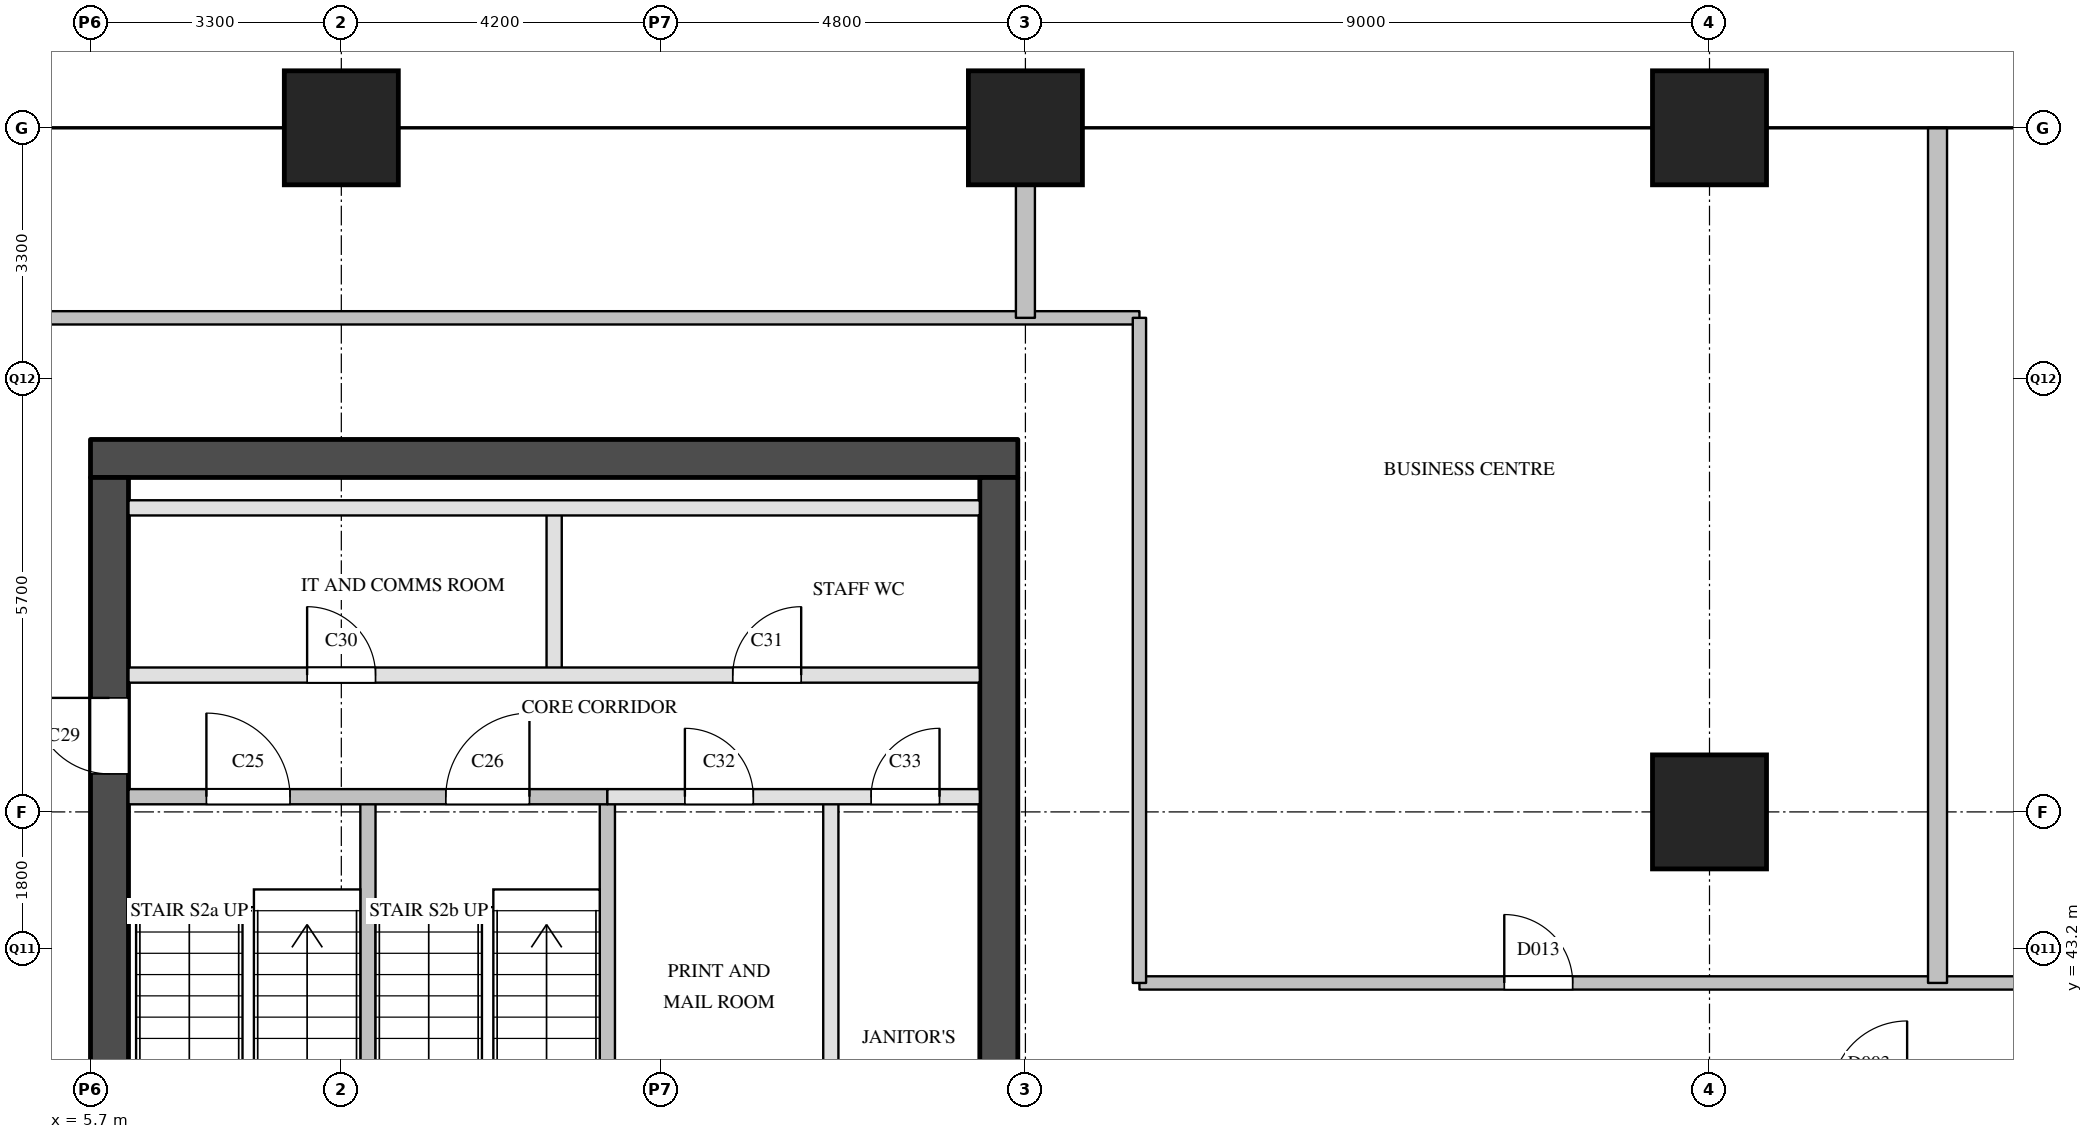
"""IFC4 building model, lengths in metres.
Left out: names, types, materials, properties, quantities, classifications, styles, units other than length and angle.
Written with IfcOpenShell. Run it as: python <this file> out.ifc"""

import sys

from ifc_helpers import new_model, si_unit, direction, frame, frame_2d, origin, origin_2d, place, context, subcontext, project, spatial, rectangle, extrude, element, fill, save


model = new_model("IFC4")
c1 = context("Model", 3, precision=1e-05, world=origin(), true_north=direction((0.0, 1.0)))
c2 = subcontext(c1, "Body", "Model", "MODEL_VIEW")
j1 = project(units=[si_unit("LENGTHUNIT", "METRE"), si_unit("PLANEANGLEUNIT", "RADIAN")], contexts=[c1])
p1 = place(None, origin())
s1 = spatial("IfcSite", under=j1, at=p1, CompositionType="ELEMENT")
p2 = place(p1, origin())
s2 = spatial("IfcBuilding", under=s1, at=p2, CompositionType="ELEMENT")
p3 = place(p2, frame((0.0, 0.0, 154.4)))
s3 = spatial("IfcBuildingStorey", under=s2, at=p3, CompositionType="ELEMENT", Elevation=154.4)
for number, where, z_axis, x_axis in (
    (1, (9.0, 54.0, 0.0), (0.0, 0.0, 1.0), (1.0, 0.0, 0.0)),
    (2, (18.0, 54.0, 0.0), (0.0, 0.0, 1.0), (1.0, 0.0, 0.0)),
    (3, (27.0, 45.0, 0.0), (0.0, 0.0, 1.0), (1.0, 0.0, 0.0)),
    (4, (27.0, 54.0, 0.0), (0.0, 0.0, 1.0), (1.0, 0.0, 0.0)),
):
    element("IfcColumn", number, at=place(p3, frame(where, z_axis=z_axis, x_axis=x_axis)), inside=s3, PredefinedType="COLUMN", context=c2, shape_type="SweptSolid", body=[
        extrude(rectangle(XDim=1.5, YDim=1.5, at=origin_2d()), origin(), (0.0, 0.0, 1.0), 3.9),
    ])
p4 = place(p3, frame((5.7, 49.65, 0.0), z_axis=(0.0, 0.0, 1.0), x_axis=(1.0, 0.0, 0.0)))
e5 = element("IfcWall", 5, at=p4, inside=s3, PredefinedType="SHEAR", context=c2, shape_type="SweptSolid", body=[
    extrude(rectangle(XDim=12.2, YDim=0.5, at=frame_2d((6.1, 0.0))), origin(), (0.0, 0.0, 1.0), 3.6),
])
p5 = place(p3, frame((5.95, 29.1, 0.0), z_axis=(0.0, 0.0, 1.0), x_axis=(0.0, 1.0, 0.0)))
e6 = element("IfcWall", 6, at=p5, inside=s3, PredefinedType="SHEAR", context=c2, shape_type="SweptSolid", body=[
    extrude(rectangle(XDim=20.3, YDim=0.5, at=frame_2d((10.15, 0.0))), origin(), (0.0, 0.0, 1.0), 3.6),
])
p6 = place(p5, frame((3.45, 0.0, 0.0)))
e7 = element("IfcOpeningElement", 7, at=p6, cuts=e6, PredefinedType="OPENING", context=c2, shape_type="SweptSolid", body=[
    extrude(rectangle(XDim=1.0, YDim=2.1, at=frame_2d((0.5, 1.05))), frame((0.0, 0.26, 0.0), z_axis=(0.0, -1.0, 0.0), x_axis=(1.0, 0.0, 0.0)), (0.0, 0.0, 1.0), 0.52),
])
p7 = place(p5, frame((16.4, 0.0, 0.0)))
e8 = element("IfcOpeningElement", 8, at=p7, cuts=e6, PredefinedType="OPENING", context=c2, shape_type="SweptSolid", body=[
    extrude(rectangle(XDim=1.0, YDim=2.1, at=frame_2d((0.5, 1.05))), frame((0.0, 0.26, 0.0), z_axis=(0.0, -1.0, 0.0), x_axis=(1.0, 0.0, 0.0)), (0.0, 0.0, 1.0), 0.52),
])
p8 = place(p3, frame((17.65, 29.1, 0.0), z_axis=(0.0, 0.0, 1.0), x_axis=(0.0, 1.0, 0.0)))
e9 = element("IfcWall", 9, at=p8, inside=s3, PredefinedType="SHEAR", context=c2, shape_type="SweptSolid", body=[
    extrude(rectangle(XDim=20.3, YDim=0.5, at=frame_2d((10.15, 0.0))), origin(), (0.0, 0.0, 1.0), 3.6),
])
p9 = place(p8, frame((1.25, 0.0, 0.0)))
e10 = element("IfcOpeningElement", 10, at=p9, cuts=e9, PredefinedType="OPENING", context=c2, shape_type="SweptSolid", body=[
    extrude(rectangle(XDim=0.7, YDim=2.1, at=frame_2d((0.35, 1.05))), frame((0.0, 0.26, 0.0), z_axis=(0.0, -1.0, 0.0), x_axis=(1.0, 0.0, 0.0)), (0.0, 0.0, 1.0), 0.52),
])
p10 = place(p8, frame((7.05, 0.0, 0.0)))
e11 = element("IfcOpeningElement", 11, at=p10, cuts=e9, PredefinedType="OPENING", context=c2, shape_type="SweptSolid", body=[
    extrude(rectangle(XDim=0.7, YDim=2.1, at=frame_2d((0.35, 1.05))), frame((0.0, 0.26, 0.0), z_axis=(0.0, -1.0, 0.0), x_axis=(1.0, 0.0, 0.0)), (0.0, 0.0, 1.0), 0.52),
])
p11 = place(p8, frame((3.6, 0.0, 0.0)))
e12 = element("IfcOpeningElement", 12, at=p11, cuts=e9, PredefinedType="OPENING", context=c2, shape_type="SweptSolid", body=[
    extrude(rectangle(XDim=1.8, YDim=2.1, at=frame_2d((0.9, 1.05))), frame((0.0, 0.26, 0.0), z_axis=(0.0, -1.0, 0.0), x_axis=(1.0, 0.0, 0.0)), (0.0, 0.0, 1.0), 0.52),
])
p12 = place(p3, frame((9.35, 40.9, 0.0), z_axis=(0.0, 0.0, 1.0), x_axis=(0.0, 1.0, 0.0)))
e13 = element("IfcWall", 13, at=p12, inside=s3, PredefinedType="SOLIDWALL", context=c2, shape_type="SweptSolid", body=[
    extrude(rectangle(XDim=4.3, YDim=0.2, at=frame_2d((2.15, 0.0))), origin(), (0.0, 0.0, 1.0), 3.6),
])
p13 = place(p3, frame((11.8, 46.8, 0.0), z_axis=(0.0, 0.0, 1.0), x_axis=(0.0, 1.0, 0.0)))
e14 = element("IfcWall", 14, at=p13, inside=s3, PredefinedType="PARTITIONING", context=c2, shape_type="SweptSolid", body=[
    extrude(rectangle(XDim=2.2, YDim=0.2, at=frame_2d((1.1, 0.0))), origin(), (0.0, 0.0, 1.0), 3.6),
])
p14 = place(p3, frame((12.5, 40.9, 0.0), z_axis=(0.0, 0.0, 1.0), x_axis=(0.0, 1.0, 0.0)))
e15 = element("IfcWall", 15, at=p14, inside=s3, PredefinedType="SOLIDWALL", context=c2, shape_type="SweptSolid", body=[
    extrude(rectangle(XDim=4.3, YDim=0.2, at=frame_2d((2.15, 0.0))), origin(), (0.0, 0.0, 1.0), 3.6),
])
p15 = place(p3, frame((15.44, 39.0, 0.0), z_axis=(0.0, 0.0, 1.0), x_axis=(0.0, 1.0, 0.0)))
e16 = element("IfcWall", 16, at=p15, inside=s3, PredefinedType="PARTITIONING", context=c2, shape_type="SweptSolid", body=[
    extrude(rectangle(XDim=6.2, YDim=0.2, at=frame_2d((3.1, 0.0))), origin(), (0.0, 0.0, 1.0), 3.6),
])
p16 = place(p3, frame((12.5, 45.2, 0.0), z_axis=(0.0, 0.0, 1.0), x_axis=(1.0, 0.0, 0.0)))
e17 = element("IfcWall", 17, at=p16, inside=s3, PredefinedType="PARTITIONING", context=c2, shape_type="SweptSolid", body=[
    extrude(rectangle(XDim=4.9, YDim=0.2, at=frame_2d((2.45, 0.0))), origin(), (0.0, 0.0, 1.0), 3.6),
])
p17 = place(p16, frame((1.02, 0.0, 0.0)))
e18 = element("IfcOpeningElement", 18, at=p17, cuts=e17, PredefinedType="OPENING", context=c2, shape_type="SweptSolid", body=[
    extrude(rectangle(XDim=0.9, YDim=2.1, at=frame_2d((0.45, 1.05))), frame((0.0, 0.11, 0.0), z_axis=(0.0, -1.0, 0.0), x_axis=(1.0, 0.0, 0.0)), (0.0, 0.0, 1.0), 0.22),
])
p18 = place(p16, frame((3.47, 0.0, 0.0)))
e19 = element("IfcOpeningElement", 19, at=p18, cuts=e17, PredefinedType="OPENING", context=c2, shape_type="SweptSolid", body=[
    extrude(rectangle(XDim=0.9, YDim=2.1, at=frame_2d((0.45, 1.05))), frame((0.0, 0.11, 0.0), z_axis=(0.0, -1.0, 0.0), x_axis=(1.0, 0.0, 0.0)), (0.0, 0.0, 1.0), 0.22),
])
p19 = place(p3, frame((6.2, 45.2, 0.0), z_axis=(0.0, 0.0, 1.0), x_axis=(1.0, 0.0, 0.0)))
e20 = element("IfcWall", 20, at=p19, inside=s3, PredefinedType="SOLIDWALL", context=c2, shape_type="SweptSolid", body=[
    extrude(rectangle(XDim=6.3, YDim=0.2, at=frame_2d((3.15, 0.0))), origin(), (0.0, 0.0, 1.0), 3.6),
])
p20 = place(p19, frame((1.025, 0.0, 0.0)))
e21 = element("IfcOpeningElement", 21, at=p20, cuts=e20, PredefinedType="OPENING", context=c2, shape_type="SweptSolid", body=[
    extrude(rectangle(XDim=1.1, YDim=2.1, at=frame_2d((0.55, 1.05))), frame((0.0, 0.11, 0.0), z_axis=(0.0, -1.0, 0.0), x_axis=(1.0, 0.0, 0.0)), (0.0, 0.0, 1.0), 0.22),
])
p21 = place(p19, frame((4.175, 0.0, 0.0)))
e22 = element("IfcOpeningElement", 22, at=p21, cuts=e20, PredefinedType="OPENING", context=c2, shape_type="SweptSolid", body=[
    extrude(rectangle(XDim=1.1, YDim=2.1, at=frame_2d((0.55, 1.05))), frame((0.0, 0.11, 0.0), z_axis=(0.0, -1.0, 0.0), x_axis=(1.0, 0.0, 0.0)), (0.0, 0.0, 1.0), 0.22),
])
p22 = place(p3, frame((6.2, 46.8, 0.0), z_axis=(0.0, 0.0, 1.0), x_axis=(1.0, 0.0, 0.0)))
e23 = element("IfcWall", 23, at=p22, inside=s3, PredefinedType="PARTITIONING", context=c2, shape_type="SweptSolid", body=[
    extrude(rectangle(XDim=11.2, YDim=0.2, at=frame_2d((5.6, 0.0))), origin(), (0.0, 0.0, 1.0), 3.6),
])
p23 = place(p22, frame((2.35, 0.0, 0.0)))
e24 = element("IfcOpeningElement", 24, at=p23, cuts=e23, PredefinedType="OPENING", context=c2, shape_type="SweptSolid", body=[
    extrude(rectangle(XDim=0.9, YDim=2.1, at=frame_2d((0.45, 1.05))), frame((0.0, 0.11, 0.0), z_axis=(0.0, -1.0, 0.0), x_axis=(1.0, 0.0, 0.0)), (0.0, 0.0, 1.0), 0.22),
])
p24 = place(p22, frame((7.95, 0.0, 0.0)))
e25 = element("IfcOpeningElement", 25, at=p24, cuts=e23, PredefinedType="OPENING", context=c2, shape_type="SweptSolid", body=[
    extrude(rectangle(XDim=0.9, YDim=2.1, at=frame_2d((0.45, 1.05))), frame((0.0, 0.11, 0.0), z_axis=(0.0, -1.0, 0.0), x_axis=(1.0, 0.0, 0.0)), (0.0, 0.0, 1.0), 0.22),
])
p25 = place(p3, frame((6.2, 49.0, 0.0), z_axis=(0.0, 0.0, 1.0), x_axis=(1.0, 0.0, 0.0)))
e26 = element("IfcWall", 26, at=p25, inside=s3, PredefinedType="PARTITIONING", context=c2, shape_type="SweptSolid", body=[
    extrude(rectangle(XDim=11.2, YDim=0.2, at=frame_2d((5.6, 0.0))), origin(), (0.0, 0.0, 1.0), 3.6),
])
p26 = place(p3, frame((19.5, 42.75, 0.0), z_axis=(0.0, 0.0, 1.0), x_axis=(1.0, 0.0, 0.0)))
e27 = element("IfcWall", 27, at=p26, inside=s3, PredefinedType="PARTITIONING", context=c2, shape_type="SweptSolid", body=[
    extrude(rectangle(XDim=15.0, YDim=0.175, at=frame_2d((7.5, 0.0))), origin(), (0.0, 0.0, 1.0), 2.6),
])
p27 = place(p26, frame((4.8, 0.0, 0.0)))
e28 = element("IfcOpeningElement", 28, at=p27, cuts=e27, PredefinedType="OPENING", context=c2, shape_type="SweptSolid", body=[
    extrude(rectangle(XDim=0.9, YDim=2.1, at=frame_2d((0.45, 1.05))), frame((0.0, 0.097, 0.0), z_axis=(0.0, -1.0, 0.0), x_axis=(1.0, 0.0, 0.0)), (0.0, 0.0, 1.0), 0.195),
])
p28 = place(p3, frame((4.1, 51.5, 0.0), z_axis=(0.0, 0.0, 1.0), x_axis=(1.0, 0.0, 0.0)))
e29 = element("IfcWall", 29, at=p28, inside=s3, PredefinedType="PARTITIONING", context=c2, shape_type="SweptSolid", body=[
    extrude(rectangle(XDim=15.4, YDim=0.175, at=frame_2d((7.7, 0.0))), origin(), (0.0, 0.0, 1.0), 3.6),
])
p29 = place(p3, frame((19.5, 42.75, 0.0), z_axis=(0.0, 0.0, 1.0), x_axis=(0.0, 1.0, 0.0)))
e30 = element("IfcWall", 30, at=p29, inside=s3, PredefinedType="PARTITIONING", context=c2, shape_type="SweptSolid", body=[
    extrude(rectangle(XDim=8.75, YDim=0.175, at=frame_2d((4.375, 0.0))), origin(), (0.0, 0.0, 1.0), 3.6),
])
p30 = place(p3, frame((18.0, 51.5, 0.0), z_axis=(0.0, 0.0, 1.0), x_axis=(0.0, 1.0, 0.0)))
e31 = element("IfcWall", 31, at=p30, inside=s3, PredefinedType="PARTITIONING", context=c2, shape_type="SweptSolid", body=[
    extrude(rectangle(XDim=2.5, YDim=0.25, at=frame_2d((1.25, 0.0))), origin(), (0.0, 0.0, 1.0), 3.6),
])
p31 = place(p3, frame((30.0, 42.75, 0.0), z_axis=(0.0, 0.0, 1.0), x_axis=(0.0, 1.0, 0.0)))
e32 = element("IfcWall", 32, at=p31, inside=s3, PredefinedType="PARTITIONING", context=c2, shape_type="SweptSolid", body=[
    extrude(rectangle(XDim=11.25, YDim=0.25, at=frame_2d((5.625, 0.0))), origin(), (0.0, 0.0, 1.0), 2.6),
])
p32 = place(p20, origin())
e33 = element("IfcDoor", 33, at=p32, inside=s3, OperationType="SINGLE_SWING_LEFT", PredefinedType="DOOR", context=c2, shape_type="SweptSolid", body=[
    extrude(rectangle(XDim=1.1, YDim=2.1, at=frame_2d((0.55, 1.05))), frame((0.0, 0.025, 0.0), z_axis=(0.0, -1.0, 0.0), x_axis=(1.0, 0.0, 0.0)), (0.0, 0.0, 1.0), 0.05),
])
fill(e21, e33)
p33 = place(p21, origin())
e34 = element("IfcDoor", 34, at=p33, inside=s3, OperationType="SINGLE_SWING_RIGHT", PredefinedType="DOOR", context=c2, shape_type="SweptSolid", body=[
    extrude(rectangle(XDim=1.1, YDim=2.1, at=frame_2d((0.55, 1.05))), frame((0.0, 0.025, 0.0), z_axis=(0.0, -1.0, 0.0), x_axis=(1.0, 0.0, 0.0)), (0.0, 0.0, 1.0), 0.05),
])
fill(e22, e34)
p34 = place(p7, origin())
e35 = element("IfcDoor", 35, at=p34, inside=s3, OperationType="SINGLE_SWING_RIGHT", PredefinedType="DOOR", context=c2, shape_type="SweptSolid", body=[
    extrude(rectangle(XDim=1.0, YDim=2.1, at=frame_2d((0.5, 1.05))), frame((0.0, 0.025, 0.0), z_axis=(0.0, -1.0, 0.0), x_axis=(1.0, 0.0, 0.0)), (0.0, 0.0, 1.0), 0.05),
])
fill(e8, e35)
p35 = place(p23, origin())
e36 = element("IfcDoor", 36, at=p35, inside=s3, OperationType="SINGLE_SWING_LEFT", PredefinedType="DOOR", context=c2, shape_type="SweptSolid", body=[
    extrude(rectangle(XDim=0.9, YDim=2.1, at=frame_2d((0.45, 1.05))), frame((0.0, 0.025, 0.0), z_axis=(0.0, -1.0, 0.0), x_axis=(1.0, 0.0, 0.0)), (0.0, 0.0, 1.0), 0.05),
])
fill(e24, e36)
p36 = place(p24, origin())
e37 = element("IfcDoor", 37, at=p36, inside=s3, OperationType="SINGLE_SWING_RIGHT", PredefinedType="DOOR", context=c2, shape_type="SweptSolid", body=[
    extrude(rectangle(XDim=0.9, YDim=2.1, at=frame_2d((0.45, 1.05))), frame((0.0, 0.025, 0.0), z_axis=(0.0, -1.0, 0.0), x_axis=(1.0, 0.0, 0.0)), (0.0, 0.0, 1.0), 0.05),
])
fill(e25, e37)
p37 = place(p17, origin())
e38 = element("IfcDoor", 38, at=p37, inside=s3, OperationType="SINGLE_SWING_LEFT", PredefinedType="DOOR", context=c2, shape_type="SweptSolid", body=[
    extrude(rectangle(XDim=0.9, YDim=2.1, at=frame_2d((0.45, 1.05))), frame((0.0, 0.025, 0.0), z_axis=(0.0, -1.0, 0.0), x_axis=(1.0, 0.0, 0.0)), (0.0, 0.0, 1.0), 0.05),
])
fill(e18, e38)
p38 = place(p18, origin())
e39 = element("IfcDoor", 39, at=p38, inside=s3, OperationType="SINGLE_SWING_RIGHT", PredefinedType="DOOR", context=c2, shape_type="SweptSolid", body=[
    extrude(rectangle(XDim=0.9, YDim=2.1, at=frame_2d((0.45, 1.05))), frame((0.0, 0.025, 0.0), z_axis=(0.0, -1.0, 0.0), x_axis=(1.0, 0.0, 0.0)), (0.0, 0.0, 1.0), 0.05),
])
fill(e19, e39)
p39 = place(p27, origin())
e40 = element("IfcDoor", 40, at=p39, inside=s3, OperationType="SINGLE_SWING_LEFT", PredefinedType="DOOR", context=c2, shape_type="SweptSolid", body=[
    extrude(rectangle(XDim=0.9, YDim=2.1, at=frame_2d((0.45, 1.05))), frame((0.0, 0.025, 0.0), z_axis=(0.0, -1.0, 0.0), x_axis=(1.0, 0.0, 0.0)), (0.0, 0.0, 1.0), 0.05),
])
fill(e28, e40)
save(model, sys.argv[1])
